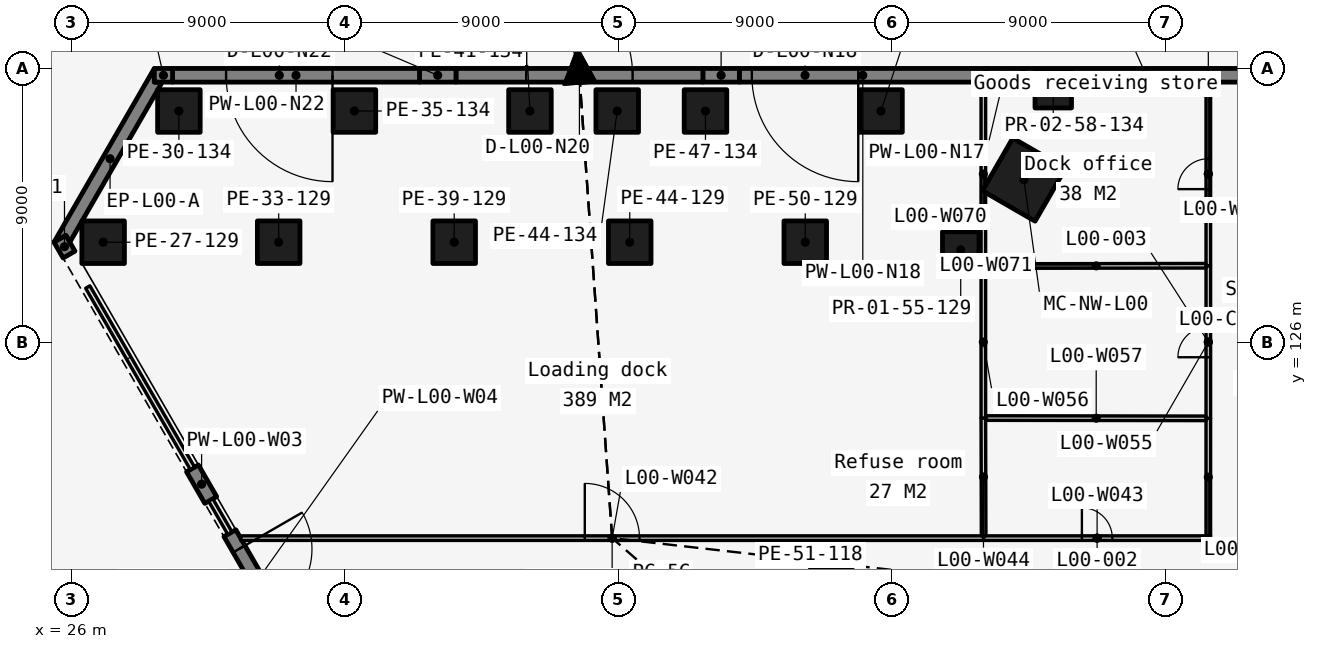
"""IFC4 building model, lengths in metres.
Left out: names, types, materials, properties, quantities, classifications, styles, units other than length and angle.
Written with IfcOpenShell. Run it as: python <this file> out.ifc"""

import sys

from ifc_helpers import new_model, si_unit, direction, frame, frame_2d, origin, origin_2d, place, context, subcontext, project, spatial, polyline, rectangle, outline, extrude, element, fill, save


model = new_model("IFC4")
c1 = context("Model", 3, precision=1e-05, world=origin(), true_north=direction((0.0, 1.0)))
c2 = subcontext(c1, "Body", "Model", "MODEL_VIEW")
j1 = project(units=[si_unit("LENGTHUNIT", "METRE"), si_unit("PLANEANGLEUNIT", "RADIAN")], contexts=[c1])
p1 = place(None, origin())
s1 = spatial("IfcSite", under=j1, at=p1, CompositionType="ELEMENT")
p2 = place(p1, origin())
s2 = spatial("IfcBuilding", under=s1, at=p2, CompositionType="ELEMENT")
p3 = place(p2, origin())
s3 = spatial("IfcBuildingStorey", under=s2, at=p3, CompositionType="ELEMENT", Elevation=0.0)
for number, where, z_axis, x_axis in (
    (1, (27.049, 129.284, 0.0), (0.0, 0.0, 1.0), (1.0, 0.0, 0.0)),
    (2, (29.541, 133.6, 0.0), (0.0, 0.0, 1.0), (1.0, 0.0, 0.0)),
    (3, (32.823, 129.284, 0.0), (0.0, 0.0, 1.0), (1.0, 0.0, 0.0)),
    (4, (35.314, 133.6, 0.0), (0.0, 0.0, 1.0), (1.0, 0.0, 0.0)),
    (5, (38.596, 129.284, 0.0), (0.0, 0.0, 1.0), (1.0, 0.0, 0.0)),
    (6, (41.088, 133.6, 0.0), (0.0, 0.0, 1.0), (1.0, 0.0, 0.0)),
    (7, (44.37, 129.284, 0.0), (0.0, 0.0, 1.0), (1.0, 0.0, 0.0)),
    (8, (43.958, 133.6, 0.0), (0.0, 0.0, 1.0), (1.0, 0.0, 0.0)),
    (9, (46.861, 133.6, 0.0), (0.0, 0.0, 1.0), (1.0, 0.0, 0.0)),
    (10, (50.143, 129.284, 0.0), (0.0, 0.0, 1.0), (1.0, 0.0, 0.0)),
    (11, (52.635, 133.6, 0.0), (0.0, 0.0, 1.0), (1.0, 0.0, 0.0)),
):
    element("IfcColumn", number, at=place(p3, frame(where, z_axis=z_axis, x_axis=x_axis)), inside=s3, PredefinedType="COLUMN", context=c2, shape_type="SweptSolid", body=[
        extrude(rectangle(XDim=1.4, YDim=1.4, at=origin_2d()), origin(), (0.0, 0.0, 1.0), 7.5),
    ])
for number, where, z_axis, x_axis in (
    (12, (55.256, 129.028, 0.0), (0.0, 0.0, 1.0), (1.0, 0.0, 0.0)),
    (13, (58.3, 134.3, 0.0), (0.0, 0.0, 1.0), (1.0, 0.0, 0.0)),
):
    element("IfcColumn", number, at=place(p3, frame(where, z_axis=z_axis, x_axis=x_axis)), inside=s3, PredefinedType="COLUMN", context=c2, shape_type="SweptSolid", body=[
        extrude(rectangle(XDim=1.2, YDim=1.2, at=origin_2d()), origin(), (0.0, 0.0, 1.0), 7.5),
    ])
p4 = place(p3, frame((57.336, 131.342, 0.0), z_axis=(0.0, 0.0, 1.0), x_axis=(-0.5, -0.866025403784, 0.0)))
e14 = element("IfcColumn", 14, at=p4, inside=s3, PredefinedType="COLUMN", context=c2, shape_type="SweptSolid", body=[
    extrude(rectangle(XDim=2.0, YDim=2.0, at=origin_2d()), origin(), (0.0, 0.0, 1.0), 7.5),
])
p5 = place(p3, frame((0.0, 0.0, -0.3)))
e15 = element("IfcWall", 15, at=p5, inside=s3, PredefinedType="SOLIDWALL", context=c2, shape_type="SweptSolid", body=[
    extrude(outline(polyline([(28.732, 135.0), (28.732, 134.55), (28.992, 134.55), (25.952, 129.284), (25.822, 129.509), (25.432, 129.284), (28.732, 135.0)])), origin(), (0.0, 0.0, 1.0), 6.812),
])
p6 = place(p3, frame((65.418, 134.775, -0.3), z_axis=(0.0, 0.0, 1.0), x_axis=(-1.0, 0.0, 0.0)))
e16 = element("IfcWall", 16, at=p6, inside=s3, PredefinedType="SOLIDWALL", context=c2, shape_type="SweptSolid", body=[
    extrude(rectangle(XDim=8.121, YDim=0.45, at=frame_2d((4.061, 0.0))), origin(), (0.0, 0.0, 1.0), 6.812),
])
p7 = place(p3, frame((57.297, 134.775, -0.3), z_axis=(0.0, 0.0, 1.0), x_axis=(-1.0, 0.0, 0.0)))
e17 = element("IfcWall", 17, at=p7, inside=s3, PredefinedType="SOLIDWALL", context=c2, shape_type="SweptSolid", body=[
    extrude(rectangle(XDim=1.2, YDim=0.45, at=frame_2d((0.6, 0.0))), origin(), (0.0, 0.0, 1.0), 6.812),
])
p8 = place(p3, frame((56.097, 134.775, -0.3), z_axis=(0.0, 0.0, 1.0), x_axis=(-1.0, 0.0, 0.0)))
e18 = element("IfcWall", 18, at=p8, inside=s3, PredefinedType="SOLIDWALL", context=c2, shape_type="SweptSolid", body=[
    extrude(rectangle(XDim=8.122, YDim=0.45, at=frame_2d((4.061, 0.0))), origin(), (0.0, 0.0, 1.0), 6.812),
])
p9 = place(p8, frame((4.211, 0.0, 0.3)))
e19 = element("IfcOpeningElement", 19, at=p9, cuts=e18, PredefinedType="OPENING", context=c2, shape_type="SweptSolid", body=[
    extrude(rectangle(XDim=3.5, YDim=4.5, at=frame_2d((1.75, 2.25))), frame((0.0, 0.235, 0.0), z_axis=(0.0, -1.0, 0.0), x_axis=(1.0, 0.0, 0.0)), (0.0, 0.0, 1.0), 0.47),
])
p10 = place(p3, frame((47.975, 134.775, -0.3), z_axis=(0.0, 0.0, 1.0), x_axis=(-1.0, 0.0, 0.0)))
e20 = element("IfcWall", 20, at=p10, inside=s3, PredefinedType="SOLIDWALL", context=c2, shape_type="SweptSolid", body=[
    extrude(rectangle(XDim=1.2, YDim=0.45, at=frame_2d((0.6, 0.0))), origin(), (0.0, 0.0, 1.0), 6.812),
])
p11 = place(p3, frame((38.654, 134.775, -0.3), z_axis=(0.0, 0.0, 1.0), x_axis=(1.0, 0.0, 0.0)))
e21 = element("IfcWall", 21, at=p11, inside=s3, PredefinedType="SOLIDWALL", context=c2, shape_type="SweptSolid", body=[
    extrude(rectangle(XDim=8.121, YDim=0.45, at=frame_2d((4.061, 0.0))), origin(), (0.0, 0.0, 1.0), 6.812),
])
p12 = place(p11, frame((2.311, 0.0, 0.3)))
e22 = element("IfcOpeningElement", 22, at=p12, cuts=e21, PredefinedType="OPENING", context=c2, shape_type="SweptSolid", body=[
    extrude(rectangle(XDim=3.5, YDim=4.5, at=frame_2d((1.75, 2.25))), frame((0.0, 0.235, 0.0), z_axis=(0.0, -1.0, 0.0), x_axis=(1.0, 0.0, 0.0)), (0.0, 0.0, 1.0), 0.47),
])
p13 = place(p3, frame((38.654, 134.775, -0.3), z_axis=(0.0, 0.0, 1.0), x_axis=(-1.0, 0.0, 0.0)))
e23 = element("IfcWall", 23, at=p13, inside=s3, PredefinedType="SOLIDWALL", context=c2, shape_type="SweptSolid", body=[
    extrude(rectangle(XDim=1.2, YDim=0.45, at=frame_2d((0.6, 0.0))), origin(), (0.0, 0.0, 1.0), 6.812),
])
p14 = place(p3, frame((37.454, 134.775, -0.3), z_axis=(0.0, 0.0, 1.0), x_axis=(-1.0, 0.0, 0.0)))
e24 = element("IfcWall", 24, at=p14, inside=s3, PredefinedType="SOLIDWALL", context=c2, shape_type="SweptSolid", body=[
    extrude(rectangle(XDim=8.121, YDim=0.45, at=frame_2d((4.061, 0.0))), origin(), (0.0, 0.0, 1.0), 6.812),
])
p15 = place(p14, frame((2.861, 0.0, 0.3)))
e25 = element("IfcOpeningElement", 25, at=p15, cuts=e24, PredefinedType="OPENING", context=c2, shape_type="SweptSolid", body=[
    extrude(rectangle(XDim=3.5, YDim=4.5, at=frame_2d((1.75, 2.25))), frame((0.0, 0.235, 0.0), z_axis=(0.0, -1.0, 0.0), x_axis=(1.0, 0.0, 0.0)), (0.0, 0.0, 1.0), 0.47),
])
p16 = place(p3, frame((29.333, 134.775, -0.3), z_axis=(0.0, 0.0, 1.0), x_axis=(-1.0, 0.0, 0.0)))
e26 = element("IfcWall", 26, at=p16, inside=s3, PredefinedType="SOLIDWALL", context=c2, shape_type="SweptSolid", body=[
    extrude(rectangle(XDim=0.6, YDim=0.45, at=frame_2d((0.3, 0.0))), origin(), (0.0, 0.0, 1.0), 6.812),
])
p17 = place(p3, frame((25.627, 129.397, -0.3), z_axis=(0.0, 0.0, 1.0), x_axis=(0.499816412211, -0.866131372301, 0.0)))
e27 = element("IfcWall", 27, at=p17, inside=s3, PredefinedType="SOLIDWALL", context=c2, shape_type="SweptSolid", body=[
    extrude(rectangle(XDim=0.6, YDim=0.45, at=frame_2d((0.3, 0.0))), origin(), (0.0, 0.0, 1.0), 6.812),
])
p18 = place(p3, frame((29.988, 121.844, -0.3), z_axis=(0.0, 0.0, 1.0), x_axis=(0.50012165622, -0.865955154139, 0.0)))
e28 = element("IfcWall", 28, at=p18, inside=s3, PredefinedType="SOLIDWALL", context=c2, shape_type="SweptSolid", body=[
    extrude(rectangle(XDim=1.2, YDim=0.45, at=frame_2d((0.6, 0.0))), origin(), (0.0, 0.0, 1.0), 6.812),
])
p19 = place(p3, frame((31.218, 119.713, -0.3), z_axis=(0.0, 0.0, 1.0), x_axis=(0.500012057535, -0.866018442252, 0.0)))
e29 = element("IfcWall", 29, at=p19, inside=s3, PredefinedType="SOLIDWALL", context=c2, shape_type="SweptSolid", body=[
    extrude(rectangle(XDim=3.6, YDim=0.45, at=frame_2d((1.8, 0.0))), origin(), (0.0, 0.0, 1.0), 6.812),
])
p20 = place(p19, frame((0.6, 0.0, 0.3)))
e30 = element("IfcOpeningElement", 30, at=p20, cuts=e29, PredefinedType="OPENING", context=c2, shape_type="SweptSolid", body=[
    extrude(rectangle(XDim=2.4, YDim=3.0, at=frame_2d((1.2, 1.5))), frame((0.0, 0.235, 0.0), z_axis=(0.0, -1.0, 0.0), x_axis=(1.0, 0.0, 0.0)), (0.0, 0.0, 1.0), 0.47),
])
p21 = place(p3, frame((31.573, 119.55, 0.0), z_axis=(0.0, 0.0, 1.0), x_axis=(1.0, 0.0, 0.0)))
e31 = element("IfcWall", 31, at=p21, inside=s3, PredefinedType="PARTITIONING", context=c2, shape_type="SweptSolid", body=[
    extrude(rectangle(XDim=24.438, YDim=0.15, at=frame_2d((12.219, 0.0))), origin(), (0.0, 0.0, 1.0), 7.2),
])
p22 = place(p21, frame((11.319, 0.0, 0.0)))
e32 = element("IfcOpeningElement", 32, at=p22, cuts=e31, PredefinedType="OPENING", context=c2, shape_type="SweptSolid", body=[
    extrude(rectangle(XDim=1.8, YDim=2.1, at=frame_2d((0.9, 1.05))), frame((0.0, 0.085, 0.0), z_axis=(0.0, -1.0, 0.0), x_axis=(1.0, 0.0, 0.0)), (0.0, 0.0, 1.0), 0.17),
])
p23 = place(p3, frame((56.01, 119.55, 0.0), z_axis=(0.0, 0.0, 1.0), x_axis=(1.0, 0.0, 0.0)))
e33 = element("IfcWall", 33, at=p23, inside=s3, PredefinedType="PARTITIONING", context=c2, shape_type="SweptSolid", body=[
    extrude(rectangle(XDim=7.464, YDim=0.15, at=frame_2d((3.732, 0.0))), origin(), (0.0, 0.0, 1.0), 7.2),
])
p24 = place(p23, frame((3.232, 0.0, 0.0)))
e34 = element("IfcOpeningElement", 34, at=p24, cuts=e33, PredefinedType="OPENING", context=c2, shape_type="SweptSolid", body=[
    extrude(rectangle(XDim=1.0, YDim=2.1, at=frame_2d((0.5, 1.05))), frame((0.0, 0.085, 0.0), z_axis=(0.0, -1.0, 0.0), x_axis=(1.0, 0.0, 0.0)), (0.0, 0.0, 1.0), 0.17),
])
p25 = place(p3, frame((56.01, 119.625, 0.0), z_axis=(0.0, 0.0, 1.0), x_axis=(-0.002520153287, 0.999996824409, 0.0)))
e35 = element("IfcWall", 35, at=p25, inside=s3, PredefinedType="PARTITIONING", context=c2, shape_type="SweptSolid", body=[
    extrude(rectangle(XDim=3.875, YDim=0.15, at=frame_2d((1.938, 0.0))), origin(), (0.0, 0.0, 1.0), 7.2),
])
p26 = place(p3, frame((63.399, 119.625, 0.0), z_axis=(0.0, 0.0, 1.0), x_axis=(0.000126334406, 0.99999999202, 0.0)))
e36 = element("IfcWall", 36, at=p26, inside=s3, PredefinedType="PARTITIONING", context=c2, shape_type="SweptSolid", body=[
    extrude(rectangle(XDim=3.865, YDim=0.15, at=frame_2d((1.933, 0.0))), origin(), (0.0, 0.0, 1.0), 7.2),
])
p27 = place(p3, frame((63.4, 123.49, 0.0), z_axis=(0.0, 0.0, 1.0), x_axis=(0.0, 1.0, 0.0)))
e37 = element("IfcWall", 37, at=p27, inside=s3, PredefinedType="PARTITIONING", context=c2, shape_type="SweptSolid", body=[
    extrude(rectangle(XDim=5.02, YDim=0.15, at=frame_2d((2.51, 0.0))), origin(), (0.0, 0.0, 1.0), 7.2),
])
p28 = place(p27, frame((2.01, 0.0, 0.0)))
e38 = element("IfcOpeningElement", 38, at=p28, cuts=e37, PredefinedType="OPENING", context=c2, shape_type="SweptSolid", body=[
    extrude(rectangle(XDim=1.0, YDim=2.1, at=frame_2d((0.5, 1.05))), frame((0.0, 0.085, 0.0), z_axis=(0.0, -1.0, 0.0), x_axis=(1.0, 0.0, 0.0)), (0.0, 0.0, 1.0), 0.17),
])
p29 = place(p3, frame((56.0, 123.5, 0.0), z_axis=(0.0, 0.0, 1.0), x_axis=(0.0, 1.0, 0.0)))
e39 = element("IfcWall", 39, at=p29, inside=s3, PredefinedType="PARTITIONING", context=c2, shape_type="SweptSolid", body=[
    extrude(rectangle(XDim=5.0, YDim=0.15, at=frame_2d((2.5, 0.0))), origin(), (0.0, 0.0, 1.0), 7.2),
])
p30 = place(p3, frame((56.1, 123.5, 0.0), z_axis=(0.0, 0.0, 1.0), x_axis=(0.999999086494, -0.001351669769, 0.0)))
e40 = element("IfcWall", 40, at=p30, inside=s3, PredefinedType="PARTITIONING", context=c2, shape_type="SweptSolid", body=[
    extrude(rectangle(XDim=7.225, YDim=0.15, at=frame_2d((3.612, 0.0))), origin(), (0.0, 0.0, 1.0), 7.2),
])
p31 = place(p3, frame((63.4, 128.51, 0.0), z_axis=(0.0, 0.0, 1.0), x_axis=(0.0, 1.0, 0.0)))
e41 = element("IfcWall", 41, at=p31, inside=s3, PredefinedType="PARTITIONING", context=c2, shape_type="SweptSolid", body=[
    extrude(rectangle(XDim=6.04, YDim=0.15, at=frame_2d((3.02, 0.0))), origin(), (0.0, 0.0, 1.0), 7.2),
])
p32 = place(p31, frame((2.52, 0.0, 0.0)))
e42 = element("IfcOpeningElement", 42, at=p32, cuts=e41, PredefinedType="OPENING", context=c2, shape_type="SweptSolid", body=[
    extrude(rectangle(XDim=1.0, YDim=2.1, at=frame_2d((0.5, 1.05))), frame((0.0, 0.085, 0.0), z_axis=(0.0, -1.0, 0.0), x_axis=(1.0, 0.0, 0.0)), (0.0, 0.0, 1.0), 0.17),
])
p33 = place(p3, frame((56.0, 128.5, 0.0), z_axis=(0.0, 0.0, 1.0), x_axis=(0.0, 1.0, 0.0)))
e43 = element("IfcWall", 43, at=p33, inside=s3, PredefinedType="PARTITIONING", context=c2, shape_type="SweptSolid", body=[
    extrude(rectangle(XDim=6.05, YDim=0.15, at=frame_2d((3.025, 0.0))), origin(), (0.0, 0.0, 1.0), 7.2),
])
p34 = place(p3, frame((56.1, 128.5, 0.0), z_axis=(0.0, 0.0, 1.0), x_axis=(0.999999086494, 0.001351669769, 0.0)))
e44 = element("IfcWall", 44, at=p34, inside=s3, PredefinedType="PARTITIONING", context=c2, shape_type="SweptSolid", body=[
    extrude(rectangle(XDim=7.225, YDim=0.15, at=frame_2d((3.612, 0.0))), origin(), (0.0, 0.0, 1.0), 7.2),
])
p35 = place(p9, origin())
e45 = element("IfcDoor", 45, at=p35, inside=s3, OperationType="ROLLINGUP", PredefinedType="DOOR", context=c2, shape_type="SweptSolid", body=[
    extrude(rectangle(XDim=3.5, YDim=4.5, at=frame_2d((1.75, 2.25))), frame((0.0, 0.025, 0.0), z_axis=(0.0, -1.0, 0.0), x_axis=(1.0, 0.0, 0.0)), (0.0, 0.0, 1.0), 0.05),
])
fill(e19, e45)
p36 = place(p12, origin())
e46 = element("IfcDoor", 46, at=p36, inside=s3, OperationType="ROLLINGUP", PredefinedType="DOOR", context=c2, shape_type="SweptSolid", body=[
    extrude(rectangle(XDim=3.5, YDim=4.5, at=frame_2d((1.75, 2.25))), frame((0.0, 0.025, 0.0), z_axis=(0.0, -1.0, 0.0), x_axis=(1.0, 0.0, 0.0)), (0.0, 0.0, 1.0), 0.05),
])
fill(e22, e46)
p37 = place(p15, origin())
e47 = element("IfcDoor", 47, at=p37, inside=s3, OperationType="ROLLINGUP", PredefinedType="DOOR", context=c2, shape_type="SweptSolid", body=[
    extrude(rectangle(XDim=3.5, YDim=4.5, at=frame_2d((1.75, 2.25))), frame((0.0, 0.025, 0.0), z_axis=(0.0, -1.0, 0.0), x_axis=(1.0, 0.0, 0.0)), (0.0, 0.0, 1.0), 0.05),
])
fill(e25, e47)
p38 = place(p20, origin())
e48 = element("IfcDoor", 48, at=p38, inside=s3, OperationType="DOUBLE_DOOR_SINGLE_SWING", PredefinedType="DOOR", context=c2, shape_type="SweptSolid", body=[
    extrude(rectangle(XDim=2.4, YDim=3.0, at=frame_2d((1.2, 1.5))), frame((0.0, 0.025, 0.0), z_axis=(0.0, -1.0, 0.0), x_axis=(1.0, 0.0, 0.0)), (0.0, 0.0, 1.0), 0.05),
])
fill(e30, e48)
p39 = place(p22, origin())
e49 = element("IfcDoor", 49, at=p39, inside=s3, OperationType="SINGLE_SWING_LEFT", PredefinedType="DOOR", context=c2, shape_type="SweptSolid", body=[
    extrude(rectangle(XDim=1.8, YDim=2.1, at=frame_2d((0.9, 1.05))), frame((0.0, 0.025, 0.0), z_axis=(0.0, -1.0, 0.0), x_axis=(1.0, 0.0, 0.0)), (0.0, 0.0, 1.0), 0.05),
])
fill(e32, e49)
p40 = place(p24, origin())
e50 = element("IfcDoor", 50, at=p40, inside=s3, OperationType="SINGLE_SWING_LEFT", PredefinedType="DOOR", context=c2, shape_type="SweptSolid", body=[
    extrude(rectangle(XDim=1.0, YDim=2.1, at=frame_2d((0.5, 1.05))), frame((0.0, 0.025, 0.0), z_axis=(0.0, -1.0, 0.0), x_axis=(1.0, 0.0, 0.0)), (0.0, 0.0, 1.0), 0.05),
])
fill(e34, e50)
p41 = place(p28, origin())
e51 = element("IfcDoor", 51, at=p41, inside=s3, OperationType="SINGLE_SWING_LEFT", PredefinedType="DOOR", context=c2, shape_type="SweptSolid", body=[
    extrude(rectangle(XDim=1.0, YDim=2.1, at=frame_2d((0.5, 1.05))), frame((0.0, 0.025, 0.0), z_axis=(0.0, -1.0, 0.0), x_axis=(1.0, 0.0, 0.0)), (0.0, 0.0, 1.0), 0.05),
])
fill(e38, e51)
p42 = place(p32, origin())
e52 = element("IfcDoor", 52, at=p42, inside=s3, OperationType="SINGLE_SWING_LEFT", PredefinedType="DOOR", context=c2, shape_type="SweptSolid", body=[
    extrude(rectangle(XDim=1.0, YDim=2.1, at=frame_2d((0.5, 1.05))), frame((0.0, 0.025, 0.0), z_axis=(0.0, -1.0, 0.0), x_axis=(1.0, 0.0, 0.0)), (0.0, 0.0, 1.0), 0.05),
])
fill(e42, e52)
save(model, sys.argv[1])
